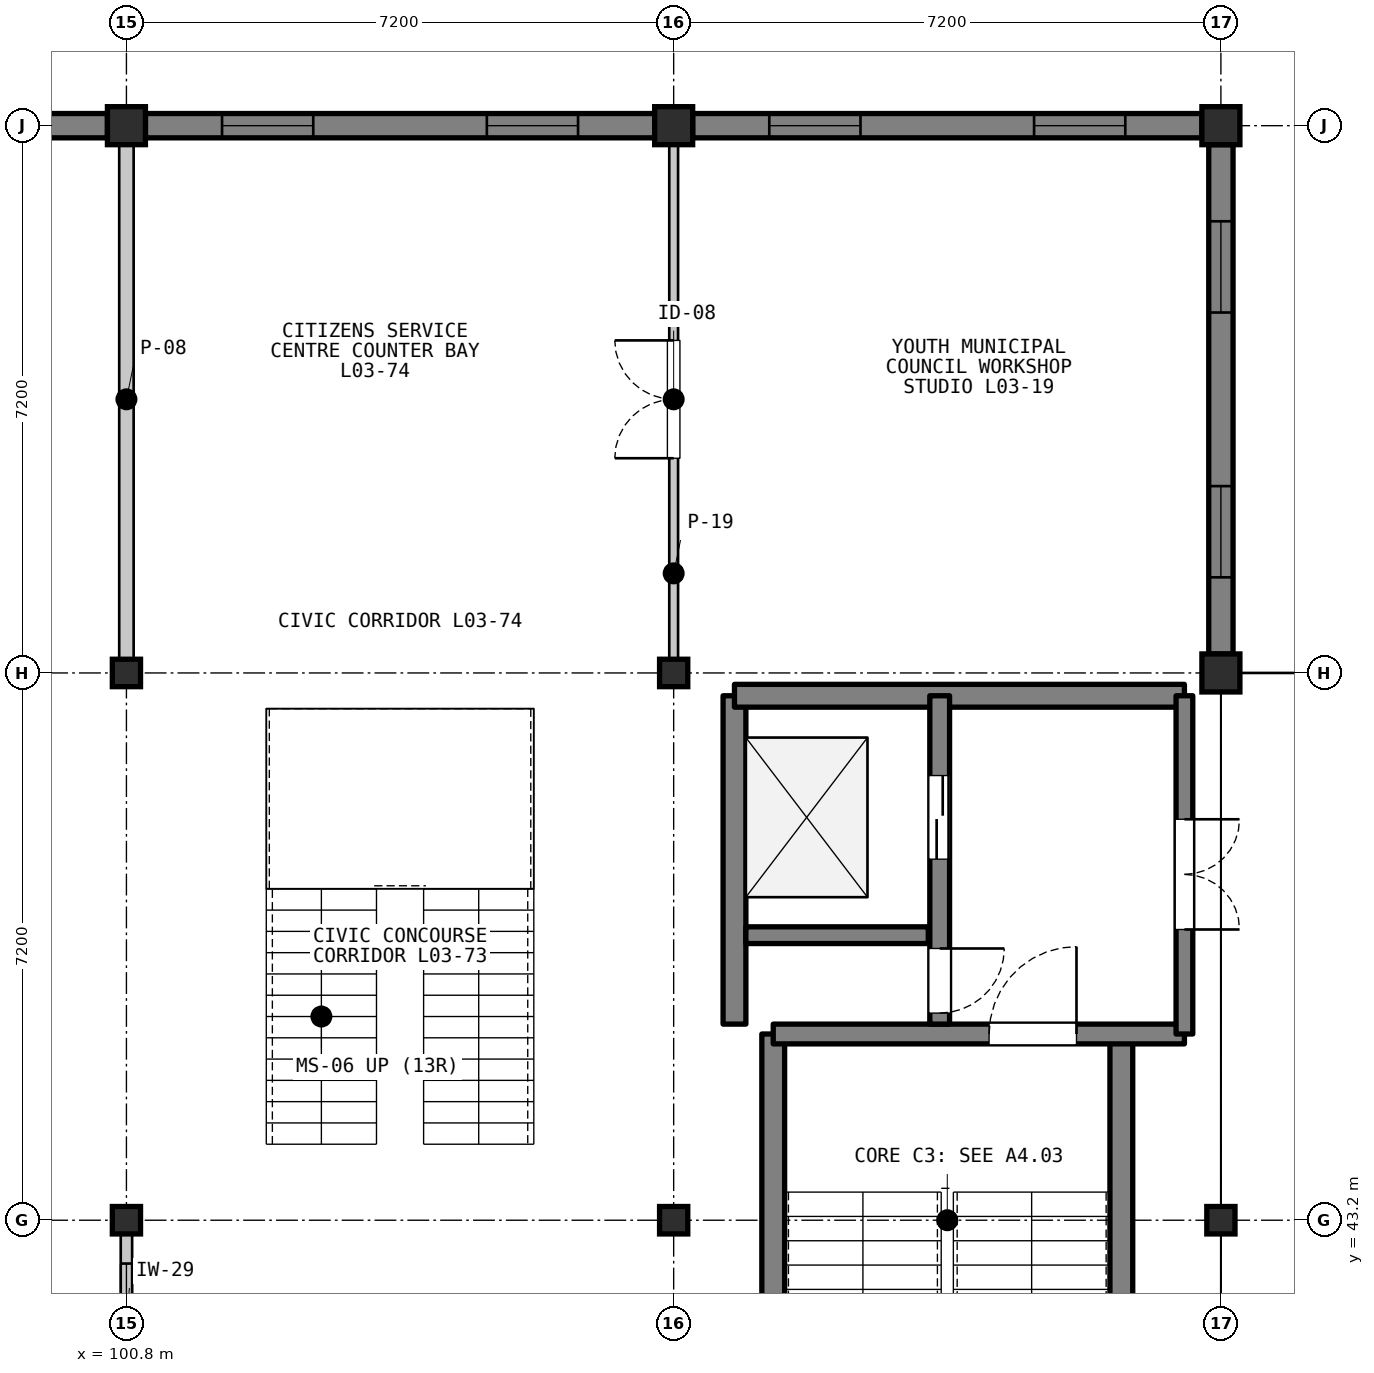
"""IFC4 building model, lengths in metres.
Left out: names, types, materials, properties, quantities, classifications, styles, units other than length and angle.
Written with IfcOpenShell. Run it as: python <this file> out.ifc"""

import sys

from ifc_helpers import new_model, si_unit, direction, frame, frame_2d, origin, origin_2d, place, context, subcontext, project, spatial, rectangle, i_section, extrude, element, fill, save


model = new_model("IFC4")
c1 = context("Model", 3, precision=1e-05, world=origin(), true_north=direction((0.0, 1.0)))
c2 = subcontext(c1, "Body", "Model", "MODEL_VIEW")
j1 = project(units=[si_unit("LENGTHUNIT", "METRE"), si_unit("PLANEANGLEUNIT", "RADIAN")], contexts=[c1])
p1 = place(None, origin())
s1 = spatial("IfcSite", under=j1, at=p1, CompositionType="ELEMENT")
p2 = place(p1, origin())
s2 = spatial("IfcBuilding", under=s1, at=p2, CompositionType="ELEMENT")
p3 = place(p2, frame((0.0, 0.0, 9.9)))
s3 = spatial("IfcBuildingStorey", under=s2, at=p3, CompositionType="ELEMENT", Elevation=9.9)
for number, where, z_axis, x_axis in (
    (1, (100.8, 43.2, 0.0), (0.0, 0.0, 1.0), (1.0, 0.0, 0.0)),
    (2, (100.8, 50.4, 0.0), (0.0, 0.0, 1.0), (1.0, 0.0, 0.0)),
):
    element("IfcColumn", number, at=place(p3, frame(where, z_axis=z_axis, x_axis=x_axis)), inside=s3, PredefinedType="COLUMN", context=c2, shape_type="SweptSolid", body=[
        extrude(i_section(OverallWidth=0.371, OverallDepth=0.361, WebThickness=0.012, FlangeThickness=0.02, FilletRadius=0.015, at=origin_2d()), origin(), (0.0, 0.0, 1.0), 4.2),
    ])
p4 = place(p3, frame((100.8, 57.6, 0.0), z_axis=(0.0, 0.0, 1.0), x_axis=(1.0, 0.0, 0.0)))
e3 = element("IfcColumn", 3, at=p4, inside=s3, PredefinedType="COLUMN", context=c2, shape_type="SweptSolid", body=[
    extrude(rectangle(XDim=0.5, YDim=0.5, at=origin_2d()), origin(), (0.0, 0.0, 1.0), 4.2),
])
for number, where, z_axis, x_axis in (
    (4, (108.0, 43.2, 0.0), (0.0, 0.0, 1.0), (1.0, 0.0, 0.0)),
    (5, (108.0, 50.4, 0.0), (0.0, 0.0, 1.0), (1.0, 0.0, 0.0)),
):
    element("IfcColumn", number, at=place(p3, frame(where, z_axis=z_axis, x_axis=x_axis)), inside=s3, PredefinedType="COLUMN", context=c2, shape_type="SweptSolid", body=[
        extrude(i_section(OverallWidth=0.371, OverallDepth=0.361, WebThickness=0.012, FlangeThickness=0.02, FilletRadius=0.015, at=origin_2d()), origin(), (0.0, 0.0, 1.0), 4.2),
    ])
p5 = place(p3, frame((108.0, 57.6, 0.0), z_axis=(0.0, 0.0, 1.0), x_axis=(1.0, 0.0, 0.0)))
e6 = element("IfcColumn", 6, at=p5, inside=s3, PredefinedType="COLUMN", context=c2, shape_type="SweptSolid", body=[
    extrude(rectangle(XDim=0.5, YDim=0.5, at=origin_2d()), origin(), (0.0, 0.0, 1.0), 4.2),
])
p6 = place(p3, frame((115.2, 43.2, 0.0), z_axis=(0.0, 0.0, 1.0), x_axis=(1.0, 0.0, 0.0)))
e7 = element("IfcColumn", 7, at=p6, inside=s3, PredefinedType="COLUMN", context=c2, shape_type="SweptSolid", body=[
    extrude(i_section(OverallWidth=0.371, OverallDepth=0.361, WebThickness=0.012, FlangeThickness=0.02, FilletRadius=0.015, at=origin_2d()), origin(), (0.0, 0.0, 1.0), 4.2),
])
for number, where, z_axis, x_axis in (
    (8, (115.2, 50.4, 0.0), (0.0, 0.0, 1.0), (1.0, 0.0, 0.0)),
    (9, (115.2, 57.6, 0.0), (0.0, 0.0, 1.0), (1.0, 0.0, 0.0)),
):
    element("IfcColumn", number, at=place(p3, frame(where, z_axis=z_axis, x_axis=x_axis)), inside=s3, PredefinedType="COLUMN", context=c2, shape_type="SweptSolid", body=[
        extrude(rectangle(XDim=0.5, YDim=0.5, at=origin_2d()), origin(), (0.0, 0.0, 1.0), 4.2),
    ])
p7 = place(p3, frame((93.85, 57.6, 0.0), z_axis=(0.0, 0.0, 1.0), x_axis=(1.0, 0.0, 0.0)))
e10 = element("IfcWall", 10, at=p7, inside=s3, PredefinedType="SOLIDWALL", context=c2, shape_type="SweptSolid", body=[
    extrude(rectangle(XDim=6.7, YDim=0.32, at=frame_2d((3.35, 0.0))), origin(), (0.0, 0.0, 1.0), 3.418),
])
p8 = place(p7, frame((1.008, 0.0, 0.95)))
e11 = element("IfcOpeningElement", 11, at=p8, cuts=e10, PredefinedType="OPENING", context=c2, shape_type="SweptSolid", body=[
    extrude(rectangle(XDim=1.2, YDim=1.7, at=frame_2d((0.6, 0.85))), frame((0.0, 0.17, 0.0), z_axis=(0.0, -1.0, 0.0), x_axis=(1.0, 0.0, 0.0)), (0.0, 0.0, 1.0), 0.34),
])
p9 = place(p7, frame((4.492, 0.0, 0.95)))
e12 = element("IfcOpeningElement", 12, at=p9, cuts=e10, PredefinedType="OPENING", context=c2, shape_type="SweptSolid", body=[
    extrude(rectangle(XDim=1.2, YDim=1.7, at=frame_2d((0.6, 0.85))), frame((0.0, 0.17, 0.0), z_axis=(0.0, -1.0, 0.0), x_axis=(1.0, 0.0, 0.0)), (0.0, 0.0, 1.0), 0.34),
])
p10 = place(p3, frame((101.05, 57.6, 0.0), z_axis=(0.0, 0.0, 1.0), x_axis=(1.0, 0.0, 0.0)))
e13 = element("IfcWall", 13, at=p10, inside=s3, PredefinedType="SOLIDWALL", context=c2, shape_type="SweptSolid", body=[
    extrude(rectangle(XDim=6.7, YDim=0.32, at=frame_2d((3.35, 0.0))), origin(), (0.0, 0.0, 1.0), 3.418),
])
p11 = place(p10, frame((1.008, 0.0, 0.95)))
e14 = element("IfcOpeningElement", 14, at=p11, cuts=e13, PredefinedType="OPENING", context=c2, shape_type="SweptSolid", body=[
    extrude(rectangle(XDim=1.2, YDim=1.7, at=frame_2d((0.6, 0.85))), frame((0.0, 0.17, 0.0), z_axis=(0.0, -1.0, 0.0), x_axis=(1.0, 0.0, 0.0)), (0.0, 0.0, 1.0), 0.34),
])
p12 = place(p10, frame((4.492, 0.0, 0.95)))
e15 = element("IfcOpeningElement", 15, at=p12, cuts=e13, PredefinedType="OPENING", context=c2, shape_type="SweptSolid", body=[
    extrude(rectangle(XDim=1.2, YDim=1.7, at=frame_2d((0.6, 0.85))), frame((0.0, 0.17, 0.0), z_axis=(0.0, -1.0, 0.0), x_axis=(1.0, 0.0, 0.0)), (0.0, 0.0, 1.0), 0.34),
])
p13 = place(p3, frame((108.25, 57.6, 0.0), z_axis=(0.0, 0.0, 1.0), x_axis=(1.0, 0.0, 0.0)))
e16 = element("IfcWall", 16, at=p13, inside=s3, PredefinedType="SOLIDWALL", context=c2, shape_type="SweptSolid", body=[
    extrude(rectangle(XDim=6.7, YDim=0.32, at=frame_2d((3.35, 0.0))), origin(), (0.0, 0.0, 1.0), 3.418),
])
p14 = place(p13, frame((1.008, 0.0, 0.95)))
e17 = element("IfcOpeningElement", 17, at=p14, cuts=e16, PredefinedType="OPENING", context=c2, shape_type="SweptSolid", body=[
    extrude(rectangle(XDim=1.2, YDim=1.7, at=frame_2d((0.6, 0.85))), frame((0.0, 0.17, 0.0), z_axis=(0.0, -1.0, 0.0), x_axis=(1.0, 0.0, 0.0)), (0.0, 0.0, 1.0), 0.34),
])
p15 = place(p13, frame((4.492, 0.0, 0.95)))
e18 = element("IfcOpeningElement", 18, at=p15, cuts=e16, PredefinedType="OPENING", context=c2, shape_type="SweptSolid", body=[
    extrude(rectangle(XDim=1.2, YDim=1.7, at=frame_2d((0.6, 0.85))), frame((0.0, 0.17, 0.0), z_axis=(0.0, -1.0, 0.0), x_axis=(1.0, 0.0, 0.0)), (0.0, 0.0, 1.0), 0.34),
])
p16 = place(p3, frame((115.2, 57.35, 0.0), z_axis=(0.0, 0.0, 1.0), x_axis=(0.0, -1.0, 0.0)))
e19 = element("IfcWall", 19, at=p16, inside=s3, PredefinedType="SOLIDWALL", context=c2, shape_type="SweptSolid", body=[
    extrude(rectangle(XDim=6.7, YDim=0.32, at=frame_2d((3.35, 0.0))), origin(), (0.0, 0.0, 1.0), 3.487),
])
p17 = place(p16, frame((1.008, 0.0, 0.95)))
e20 = element("IfcOpeningElement", 20, at=p17, cuts=e19, PredefinedType="OPENING", context=c2, shape_type="SweptSolid", body=[
    extrude(rectangle(XDim=1.2, YDim=1.7, at=frame_2d((0.6, 0.85))), frame((0.0, 0.17, 0.0), z_axis=(0.0, -1.0, 0.0), x_axis=(1.0, 0.0, 0.0)), (0.0, 0.0, 1.0), 0.34),
])
p18 = place(p16, frame((4.492, 0.0, 0.95)))
e21 = element("IfcOpeningElement", 21, at=p18, cuts=e19, PredefinedType="OPENING", context=c2, shape_type="SweptSolid", body=[
    extrude(rectangle(XDim=1.2, YDim=1.7, at=frame_2d((0.6, 0.85))), frame((0.0, 0.17, 0.0), z_axis=(0.0, -1.0, 0.0), x_axis=(1.0, 0.0, 0.0)), (0.0, 0.0, 1.0), 0.34),
])
for number, where, z_axis, x_axis in (
    (22, (109.31, 36.35, 0.0), (0.0, 0.0, 1.0), (0.0, 1.0, 0.0)),
    (23, (113.89, 36.35, 0.0), (0.0, 0.0, 1.0), (0.0, 1.0, 0.0)),
):
    element("IfcWall", number, at=place(p3, frame(where, z_axis=z_axis, x_axis=x_axis)), inside=s3, PredefinedType="SHEAR", context=c2, shape_type="SweptSolid", body=[
        extrude(rectangle(XDim=9.3, YDim=0.3, at=frame_2d((4.65, 0.0))), origin(), (0.0, 0.0, 1.0), 4.02),
    ])
p19 = place(p3, frame((109.31, 45.65, 0.0), z_axis=(0.0, 0.0, 1.0), x_axis=(1.0, 0.0, 0.0)))
e24 = element("IfcWall", 24, at=p19, inside=s3, PredefinedType="SHEAR", context=c2, shape_type="SweptSolid", body=[
    extrude(rectangle(XDim=5.41, YDim=0.26, at=frame_2d((2.705, 0.0))), origin(), (0.0, 0.0, 1.0), 4.02),
])
p20 = place(p19, frame((2.84, 0.0, 0.0)))
e25 = element("IfcOpeningElement", 25, at=p20, cuts=e24, PredefinedType="OPENING", context=c2, shape_type="SweptSolid", body=[
    extrude(rectangle(XDim=1.15, YDim=2.15, at=frame_2d((0.575, 1.075))), frame((0.0, 0.14, 0.0), z_axis=(0.0, -1.0, 0.0), x_axis=(1.0, 0.0, 0.0)), (0.0, 0.0, 1.0), 0.28),
])
p21 = place(p3, frame((108.8, 45.78, 0.0), z_axis=(0.0, 0.0, 1.0), x_axis=(0.0, 1.0, 0.0)))
e26 = element("IfcWall", 26, at=p21, inside=s3, PredefinedType="SHEAR", context=c2, shape_type="SweptSolid", body=[
    extrude(rectangle(XDim=4.32, YDim=0.3, at=frame_2d((2.16, 0.0))), origin(), (0.0, 0.0, 1.0), 4.02),
])
p22 = place(p3, frame((108.8, 50.1, 0.0), z_axis=(0.0, 0.0, 1.0), x_axis=(1.0, 0.0, 0.0)))
e27 = element("IfcWall", 27, at=p22, inside=s3, PredefinedType="SHEAR", context=c2, shape_type="SweptSolid", body=[
    extrude(rectangle(XDim=5.92, YDim=0.3, at=frame_2d((2.96, 0.0))), origin(), (0.0, 0.0, 1.0), 4.02),
])
p23 = place(p3, frame((108.95, 46.95, 0.0), z_axis=(0.0, 0.0, 1.0), x_axis=(1.0, 0.0, 0.0)))
e28 = element("IfcWall", 28, at=p23, inside=s3, PredefinedType="SHEAR", context=c2, shape_type="SweptSolid", body=[
    extrude(rectangle(XDim=2.4, YDim=0.22, at=frame_2d((1.2, 0.0))), origin(), (0.0, 0.0, 1.0), 4.02),
])
p24 = place(p3, frame((111.5, 50.1, 0.0), z_axis=(0.0, 0.0, 1.0), x_axis=(0.0, -1.0, 0.0)))
e29 = element("IfcWall", 29, at=p24, inside=s3, PredefinedType="SHEAR", context=c2, shape_type="SweptSolid", body=[
    extrude(rectangle(XDim=4.32, YDim=0.26, at=frame_2d((2.16, 0.0))), origin(), (0.0, 0.0, 1.0), 4.02),
])
p25 = place(p24, frame((1.05, 0.0, 0.0)))
e30 = element("IfcOpeningElement", 30, at=p25, cuts=e29, PredefinedType="OPENING", context=c2, shape_type="SweptSolid", body=[
    extrude(rectangle(XDim=1.1, YDim=2.15, at=frame_2d((0.55, 1.075))), frame((0.0, 0.14, 0.0), z_axis=(0.0, -1.0, 0.0), x_axis=(1.0, 0.0, 0.0)), (0.0, 0.0, 1.0), 0.28),
])
p26 = place(p24, frame((3.325, 0.0, 0.0)))
e31 = element("IfcOpeningElement", 31, at=p26, cuts=e29, PredefinedType="OPENING", context=c2, shape_type="SweptSolid", body=[
    extrude(rectangle(XDim=0.85, YDim=2.05, at=frame_2d((0.425, 1.025))), frame((0.0, 0.14, 0.0), z_axis=(0.0, -1.0, 0.0), x_axis=(1.0, 0.0, 0.0)), (0.0, 0.0, 1.0), 0.28),
])
p27 = place(p3, frame((114.72, 50.1, 0.0), z_axis=(0.0, 0.0, 1.0), x_axis=(0.0, -1.0, 0.0)))
e32 = element("IfcWall", 32, at=p27, inside=s3, PredefinedType="SHEAR", context=c2, shape_type="SweptSolid", body=[
    extrude(rectangle(XDim=4.45, YDim=0.22, at=frame_2d((2.225, 0.0))), origin(), (0.0, 0.0, 1.0), 4.02),
])
p28 = place(p27, frame((1.625, 0.0, 0.0)))
e33 = element("IfcOpeningElement", 33, at=p28, cuts=e32, PredefinedType="OPENING", context=c2, shape_type="SweptSolid", body=[
    extrude(rectangle(XDim=1.45, YDim=2.2, at=frame_2d((0.725, 1.1))), frame((0.0, 0.12, 0.0), z_axis=(0.0, -1.0, 0.0), x_axis=(1.0, 0.0, 0.0)), (0.0, 0.0, 1.0), 0.24),
])
p29 = place(p3, frame((100.8, 57.48, 0.0), z_axis=(0.0, 0.0, 1.0), x_axis=(0.0, -1.0, 0.0)))
e34 = element("IfcWall", 34, at=p29, inside=s3, PredefinedType="PARTITIONING", context=c2, shape_type="SweptSolid", body=[
    extrude(rectangle(XDim=6.96, YDim=0.19, at=frame_2d((3.48, 0.0))), origin(), (0.0, 0.0, 1.0), 3.408),
])
p30 = place(p3, frame((100.8, 43.08, 0.0), z_axis=(0.0, 0.0, 1.0), x_axis=(0.0, -1.0, 0.0)))
e35 = element("IfcWall", 35, at=p30, inside=s3, PredefinedType="PARTITIONING", context=c2, shape_type="SweptSolid", body=[
    extrude(rectangle(XDim=6.96, YDim=0.15, at=frame_2d((3.48, 0.0))), origin(), (0.0, 0.0, 1.0), 3.408),
])
p31 = place(p30, frame((2.555, 0.0, 0.0)))
e36 = element("IfcOpeningElement", 36, at=p31, cuts=e35, PredefinedType="OPENING", context=c2, shape_type="SweptSolid", body=[
    extrude(rectangle(XDim=1.85, YDim=2.45, at=frame_2d((0.925, 1.225))), frame((0.0, 0.085, 0.0), z_axis=(0.0, -1.0, 0.0), x_axis=(1.0, 0.0, 0.0)), (0.0, 0.0, 1.0), 0.17),
])
p32 = place(p30, frame((0.45, 0.0, 1.05)))
e37 = element("IfcOpeningElement", 37, at=p32, cuts=e35, PredefinedType="OPENING", context=c2, shape_type="SweptSolid", body=[
    extrude(rectangle(XDim=1.52, YDim=0.96, at=frame_2d((0.76, 0.48))), frame((0.0, 0.085, 0.0), z_axis=(0.0, -1.0, 0.0), x_axis=(1.0, 0.0, 0.0)), (0.0, 0.0, 1.0), 0.17),
])
p33 = place(p3, frame((108.0, 50.52, 0.0), z_axis=(0.0, 0.0, 1.0), x_axis=(0.0, 1.0, 0.0)))
e38 = element("IfcWall", 38, at=p33, inside=s3, PredefinedType="PARTITIONING", context=c2, shape_type="SweptSolid", body=[
    extrude(rectangle(XDim=6.96, YDim=0.116, at=frame_2d((3.48, 0.0))), origin(), (0.0, 0.0, 1.0), 3.408),
])
p34 = place(p33, frame((2.705, 0.0, 0.0)))
e39 = element("IfcOpeningElement", 39, at=p34, cuts=e38, PredefinedType="OPENING", context=c2, shape_type="SweptSolid", body=[
    extrude(rectangle(XDim=1.55, YDim=2.3, at=frame_2d((0.775, 1.15))), frame((0.0, 0.068, 0.0), z_axis=(0.0, -1.0, 0.0), x_axis=(1.0, 0.0, 0.0)), (0.0, 0.0, 1.0), 0.136),
])
p35 = place(p11, origin())
e40 = element("IfcWindow", 40, at=p35, inside=s3, PartitioningType="SINGLE_PANEL", PredefinedType="WINDOW", context=c2, shape_type="SweptSolid", body=[
    extrude(rectangle(XDim=1.2, YDim=1.7, at=frame_2d((0.6, 0.85))), frame((0.0, 0.03, 0.0), z_axis=(0.0, -1.0, 0.0), x_axis=(1.0, 0.0, 0.0)), (0.0, 0.0, 1.0), 0.06),
])
fill(e14, e40)
p36 = place(p12, origin())
e41 = element("IfcWindow", 41, at=p36, inside=s3, PartitioningType="SINGLE_PANEL", PredefinedType="WINDOW", context=c2, shape_type="SweptSolid", body=[
    extrude(rectangle(XDim=1.2, YDim=1.7, at=frame_2d((0.6, 0.85))), frame((0.0, 0.03, 0.0), z_axis=(0.0, -1.0, 0.0), x_axis=(1.0, 0.0, 0.0)), (0.0, 0.0, 1.0), 0.06),
])
fill(e15, e41)
p37 = place(p14, origin())
e42 = element("IfcWindow", 42, at=p37, inside=s3, PartitioningType="SINGLE_PANEL", PredefinedType="WINDOW", context=c2, shape_type="SweptSolid", body=[
    extrude(rectangle(XDim=1.2, YDim=1.7, at=frame_2d((0.6, 0.85))), frame((0.0, 0.03, 0.0), z_axis=(0.0, -1.0, 0.0), x_axis=(1.0, 0.0, 0.0)), (0.0, 0.0, 1.0), 0.06),
])
fill(e17, e42)
p38 = place(p15, origin())
e43 = element("IfcWindow", 43, at=p38, inside=s3, PartitioningType="SINGLE_PANEL", PredefinedType="WINDOW", context=c2, shape_type="SweptSolid", body=[
    extrude(rectangle(XDim=1.2, YDim=1.7, at=frame_2d((0.6, 0.85))), frame((0.0, 0.03, 0.0), z_axis=(0.0, -1.0, 0.0), x_axis=(1.0, 0.0, 0.0)), (0.0, 0.0, 1.0), 0.06),
])
fill(e18, e43)
p39 = place(p17, origin())
e44 = element("IfcWindow", 44, at=p39, inside=s3, PartitioningType="SINGLE_PANEL", PredefinedType="WINDOW", context=c2, shape_type="SweptSolid", body=[
    extrude(rectangle(XDim=1.2, YDim=1.7, at=frame_2d((0.6, 0.85))), frame((0.0, 0.03, 0.0), z_axis=(0.0, -1.0, 0.0), x_axis=(1.0, 0.0, 0.0)), (0.0, 0.0, 1.0), 0.06),
])
fill(e20, e44)
p40 = place(p18, origin())
e45 = element("IfcWindow", 45, at=p40, inside=s3, PartitioningType="SINGLE_PANEL", PredefinedType="WINDOW", context=c2, shape_type="SweptSolid", body=[
    extrude(rectangle(XDim=1.2, YDim=1.7, at=frame_2d((0.6, 0.85))), frame((0.0, 0.03, 0.0), z_axis=(0.0, -1.0, 0.0), x_axis=(1.0, 0.0, 0.0)), (0.0, 0.0, 1.0), 0.06),
])
fill(e21, e45)
p41 = place(p20, origin())
e46 = element("IfcDoor", 46, at=p41, inside=s3, OperationType="SINGLE_SWING_RIGHT", PredefinedType="DOOR", context=c2, shape_type="SweptSolid", body=[
    extrude(rectangle(XDim=1.15, YDim=2.15, at=frame_2d((0.575, 1.075))), frame((0.0, 0.025, 0.0), z_axis=(0.0, -1.0, 0.0), x_axis=(1.0, 0.0, 0.0)), (0.0, 0.0, 1.0), 0.05),
])
fill(e25, e46)
p42 = place(p25, origin())
e47 = element("IfcDoor", 47, at=p42, inside=s3, OperationType="DOUBLE_DOOR_SLIDING", PredefinedType="DOOR", context=c2, shape_type="SweptSolid", body=[
    extrude(rectangle(XDim=1.1, YDim=2.15, at=frame_2d((0.55, 1.075))), frame((0.0, 0.025, 0.0), z_axis=(0.0, -1.0, 0.0), x_axis=(1.0, 0.0, 0.0)), (0.0, 0.0, 1.0), 0.05),
])
fill(e30, e47)
p43 = place(p26, origin())
e48 = element("IfcDoor", 48, at=p43, inside=s3, OperationType="SINGLE_SWING_LEFT", PredefinedType="DOOR", context=c2, shape_type="SweptSolid", body=[
    extrude(rectangle(XDim=0.85, YDim=2.05, at=frame_2d((0.425, 1.025))), frame((0.0, 0.025, 0.0), z_axis=(0.0, -1.0, 0.0), x_axis=(1.0, 0.0, 0.0)), (0.0, 0.0, 1.0), 0.05),
])
fill(e31, e48)
p44 = place(p28, origin())
e49 = element("IfcDoor", 49, at=p44, inside=s3, OperationType="DOUBLE_DOOR_SINGLE_SWING", PredefinedType="DOOR", context=c2, shape_type="SweptSolid", body=[
    extrude(rectangle(XDim=1.45, YDim=2.2, at=frame_2d((0.725, 1.1))), frame((0.0, 0.025, 0.0), z_axis=(0.0, -1.0, 0.0), x_axis=(1.0, 0.0, 0.0)), (0.0, 0.0, 1.0), 0.05),
])
fill(e33, e49)
p45 = place(p32, origin())
e50 = element("IfcWindow", 50, at=p45, inside=s3, PartitioningType="SINGLE_PANEL", PredefinedType="WINDOW", context=c2, shape_type="SweptSolid", body=[
    extrude(rectangle(XDim=1.52, YDim=0.96, at=frame_2d((0.76, 0.48))), frame((0.0, 0.03, 0.0), z_axis=(0.0, -1.0, 0.0), x_axis=(1.0, 0.0, 0.0)), (0.0, 0.0, 1.0), 0.06),
])
fill(e37, e50)
p46 = place(p34, origin())
e51 = element("IfcDoor", 51, at=p46, inside=s3, OperationType="DOUBLE_DOOR_SINGLE_SWING", PredefinedType="DOOR", context=c2, shape_type="SweptSolid", body=[
    extrude(rectangle(XDim=1.55, YDim=2.3, at=frame_2d((0.775, 1.15))), frame((0.0, 0.025, 0.0), z_axis=(0.0, -1.0, 0.0), x_axis=(1.0, 0.0, 0.0)), (0.0, 0.0, 1.0), 0.05),
])
fill(e39, e51)
save(model, sys.argv[1])
